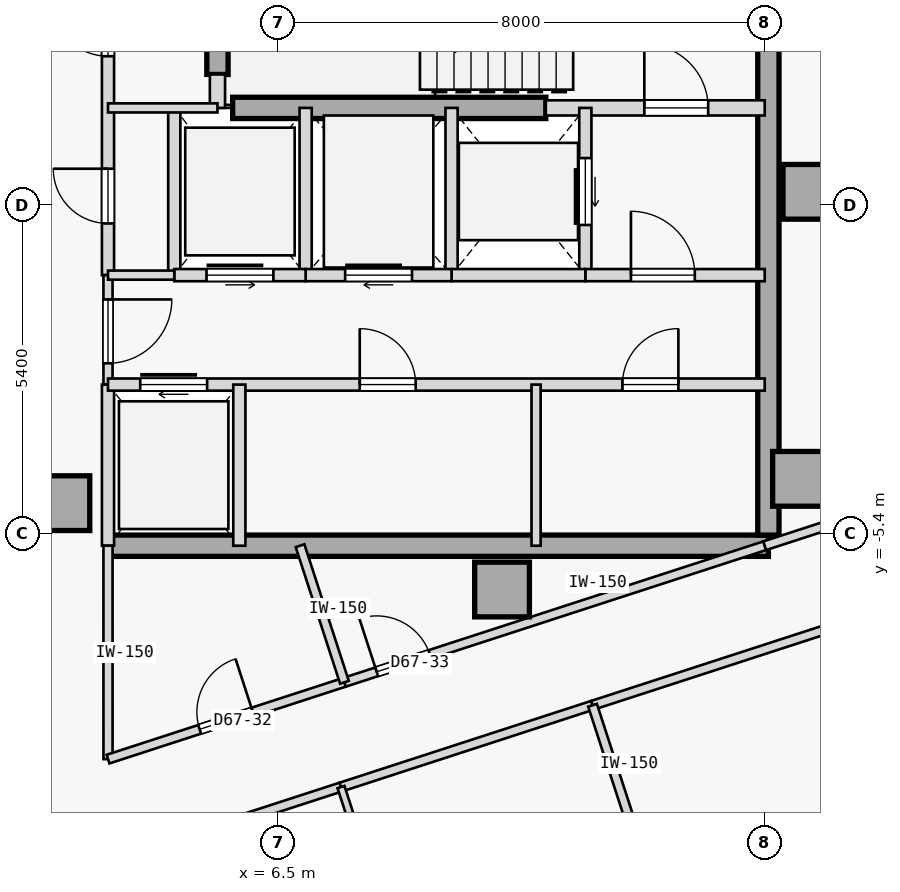
"""IFC4 building model, lengths in metres.
Left out: names, types, materials, properties, quantities, classifications, styles, units other than length and angle.
Written with IfcOpenShell. Run it as: python <this file> out.ifc"""

import sys

from ifc_helpers import new_model, si_unit, direction, frame, frame_2d, origin, origin_2d, place, context, subcontext, project, spatial, rectangle, extrude, element, fill, save


model = new_model("IFC4")
c1 = context("Model", 3, precision=1e-05, world=origin(), true_north=direction((0.0, 1.0)))
c2 = subcontext(c1, "Body", "Model", "MODEL_VIEW")
j1 = project(units=[si_unit("LENGTHUNIT", "METRE"), si_unit("PLANEANGLEUNIT", "RADIAN")], contexts=[c1])
p1 = place(None, origin())
s1 = spatial("IfcSite", under=j1, at=p1, CompositionType="ELEMENT")
p2 = place(p1, origin())
s2 = spatial("IfcBuilding", under=s1, at=p2, CompositionType="ELEMENT")
p3 = place(p2, frame((0.0, 0.0, 251.1)))
s3 = spatial("IfcBuildingStorey", under=s2, at=p3, CompositionType="ELEMENT", Elevation=251.1)
for number, where, z_axis, x_axis in (
    (1, (15.25, 0.22, 0.0), (0.0, 0.0, 1.0), (1.0, 0.0, 0.0)),
    (2, (15.08, -4.5, 0.0), (0.0, 0.0, 1.0), (1.0, 0.0, 0.0)),
    (3, (10.18, -6.32, 0.0), (0.0, 0.0, 1.0), (1.0, 0.0, 0.0)),
    (4, (2.95, -4.9, 0.0), (0.0, 0.0, 1.0), (1.0, 0.0, 0.0)),
):
    element("IfcColumn", number, at=place(p3, frame(where, z_axis=z_axis, x_axis=x_axis)), inside=s3, PredefinedType="COLUMN", context=c2, shape_type="SweptSolid", body=[
        extrude(rectangle(XDim=0.9, YDim=0.9, at=origin_2d()), origin(), (0.0, 0.0, 1.0), 3.35),
    ])
p4 = place(p3, frame((3.7, -5.6, 0.0), z_axis=(0.0, 0.0, 1.0), x_axis=(1.0, 0.0, 0.0)))
e5 = element("IfcWall", 5, at=p4, inside=s3, PredefinedType="SHEAR", context=c2, shape_type="SweptSolid", body=[
    extrude(rectangle(XDim=10.86, YDim=0.35, at=frame_2d((5.43, 0.0))), origin(), (0.0, 0.0, 1.0), 2.95),
])
p5 = place(p3, frame((14.56, -5.425, 0.0), z_axis=(0.0, 0.0, 1.0), x_axis=(0.0, 1.0, 0.0)))
e6 = element("IfcWall", 6, at=p5, inside=s3, PredefinedType="SHEAR", context=c2, shape_type="SweptSolid", body=[
    extrude(rectangle(XDim=10.85, YDim=0.35, at=frame_2d((5.425, 0.0))), origin(), (0.0, 0.0, 1.0), 2.95),
])
p6 = place(p3, frame((5.5, 2.15, 0.0), z_axis=(0.0, 0.0, 1.0), x_axis=(0.0, 1.0, 0.0)))
e7 = element("IfcWall", 7, at=p6, inside=s3, PredefinedType="SHEAR", context=c2, shape_type="SweptSolid", body=[
    extrude(rectangle(XDim=3.275, YDim=0.35, at=frame_2d((1.638, 0.0))), origin(), (0.0, 0.0, 1.0), 2.95),
])
p7 = place(p3, frame((5.75, 1.6, 0.0), z_axis=(0.0, 0.0, 1.0), x_axis=(1.0, 0.0, 0.0)))
e8 = element("IfcWall", 8, at=p7, inside=s3, PredefinedType="SHEAR", context=c2, shape_type="SweptSolid", body=[
    extrude(rectangle(XDim=5.15, YDim=0.35, at=frame_2d((2.575, 0.0))), origin(), (0.0, 0.0, 1.0), 2.95),
])
p8 = place(p3, frame((10.9, 1.6, 0.0), z_axis=(0.0, 0.0, 1.0), x_axis=(1.0, 0.0, 0.0)))
e9 = element("IfcWall", 9, at=p8, inside=s3, PredefinedType="STANDARD", context=c2, shape_type="SweptSolid", body=[
    extrude(rectangle(XDim=3.6, YDim=0.25, at=frame_2d((1.8, 0.0))), origin(), (0.0, 0.0, 1.0), 2.95),
])
p9 = place(p8, frame((1.62, 0.0, 0.0)))
e10 = element("IfcOpeningElement", 10, at=p9, cuts=e9, PredefinedType="OPENING", context=c2, shape_type="SweptSolid", body=[
    extrude(rectangle(XDim=1.05, YDim=2.15, at=frame_2d((0.525, 1.075))), frame((0.0, 0.135, 0.0), z_axis=(0.0, -1.0, 0.0), x_axis=(1.0, 0.0, 0.0)), (0.0, 0.0, 1.0), 0.27),
])
p10 = place(p3, frame((5.5, 1.6, 0.0), z_axis=(0.0, 0.0, 1.0), x_axis=(0.0, 1.0, 0.0)))
e11 = element("IfcWall", 11, at=p10, inside=s3, PredefinedType="STANDARD", context=c2, shape_type="SweptSolid", body=[
    extrude(rectangle(XDim=0.55, YDim=0.25, at=frame_2d((0.275, 0.0))), origin(), (0.0, 0.0, 1.0), 2.95),
])
p11 = place(p3, frame((3.7, -1.15, 0.0), z_axis=(0.0, 0.0, 1.0), x_axis=(0.0, 1.0, 0.0)))
e12 = element("IfcWall", 12, at=p11, inside=s3, PredefinedType="STANDARD", context=c2, shape_type="SweptSolid", body=[
    extrude(rectangle(XDim=6.75, YDim=0.2, at=frame_2d((3.375, 0.0))), origin(), (0.0, 0.0, 1.0), 2.95),
])
p12 = place(p11, frame((3.6, 0.0, 0.0)))
e13 = element("IfcOpeningElement", 13, at=p12, cuts=e12, PredefinedType="OPENING", context=c2, shape_type="SweptSolid", body=[
    extrude(rectangle(XDim=0.92, YDim=2.15, at=frame_2d((0.46, 1.075))), frame((0.0, 0.11, 0.0), z_axis=(0.0, -1.0, 0.0), x_axis=(1.0, 0.0, 0.0)), (0.0, 0.0, 1.0), 0.22),
])
p13 = place(p11, frame((0.85, 0.0, 0.0)))
e14 = element("IfcOpeningElement", 14, at=p13, cuts=e12, PredefinedType="OPENING", context=c2, shape_type="SweptSolid", body=[
    extrude(rectangle(XDim=0.9, YDim=2.15, at=frame_2d((0.45, 1.075))), frame((0.0, 0.11, 0.0), z_axis=(0.0, -1.0, 0.0), x_axis=(1.0, 0.0, 0.0)), (0.0, 0.0, 1.0), 0.22),
])
p14 = place(p3, frame((3.7, -2.95, 0.0), z_axis=(0.0, 0.0, 1.0), x_axis=(0.0, 1.0, 0.0)))
e15 = element("IfcWall", 15, at=p14, inside=s3, PredefinedType="PARTITIONING", context=c2, shape_type="SweptSolid", body=[
    extrude(rectangle(XDim=1.8, YDim=0.15, at=frame_2d((0.9, 0.0))), origin(), (0.0, 0.0, 1.0), 2.95),
])
p15 = place(p14, frame((0.35, 0.0, 0.0)))
e16 = element("IfcOpeningElement", 16, at=p15, cuts=e15, PredefinedType="OPENING", context=c2, shape_type="SweptSolid", body=[
    extrude(rectangle(XDim=1.05, YDim=2.18, at=frame_2d((0.525, 1.09))), frame((0.0, 0.085, 0.0), z_axis=(0.0, -1.0, 0.0), x_axis=(1.0, 0.0, 0.0)), (0.0, 0.0, 1.0), 0.17),
])
p16 = place(p3, frame((3.7, -5.6, 0.0), z_axis=(0.0, 0.0, 1.0), x_axis=(0.0, 1.0, 0.0)))
e17 = element("IfcWall", 17, at=p16, inside=s3, PredefinedType="STANDARD", context=c2, shape_type="SweptSolid", body=[
    extrude(rectangle(XDim=2.65, YDim=0.2, at=frame_2d((1.325, 0.0))), origin(), (0.0, 0.0, 1.0), 2.95),
])
p17 = place(p3, frame((11.55, -1.15, 0.0), z_axis=(0.0, 0.0, 1.0), x_axis=(0.0, 1.0, 0.0)))
e18 = element("IfcWall", 18, at=p17, inside=s3, PredefinedType="STANDARD", context=c2, shape_type="SweptSolid", body=[
    extrude(rectangle(XDim=2.75, YDim=0.2, at=frame_2d((1.375, 0.0))), origin(), (0.0, 0.0, 1.0), 2.95),
])
p18 = place(p17, frame((0.825, 0.0, 0.0)))
e19 = element("IfcOpeningElement", 19, at=p18, cuts=e18, PredefinedType="OPENING", context=c2, shape_type="SweptSolid", body=[
    extrude(rectangle(XDim=1.1, YDim=2.15, at=frame_2d((0.55, 1.075))), frame((0.0, 0.11, 0.0), z_axis=(0.0, -1.0, 0.0), x_axis=(1.0, 0.0, 0.0)), (0.0, 0.0, 1.0), 0.22),
])
p19 = place(p3, frame((9.35, -1.15, 0.0), z_axis=(0.0, 0.0, 1.0), x_axis=(0.0, 1.0, 0.0)))
e20 = element("IfcWall", 20, at=p19, inside=s3, PredefinedType="STANDARD", context=c2, shape_type="SweptSolid", body=[
    extrude(rectangle(XDim=2.75, YDim=0.2, at=frame_2d((1.375, 0.0))), origin(), (0.0, 0.0, 1.0), 2.95),
])
p20 = place(p3, frame((11.55, -1.15, 0.0), z_axis=(0.0, 0.0, 1.0), x_axis=(1.0, 0.0, 0.0)))
e21 = element("IfcWall", 21, at=p20, inside=s3, PredefinedType="STANDARD", context=c2, shape_type="SweptSolid", body=[
    extrude(rectangle(XDim=2.95, YDim=0.2, at=frame_2d((1.475, 0.0))), origin(), (0.0, 0.0, 1.0), 2.95),
])
p21 = place(p20, frame((0.75, 0.0, 0.0)))
e22 = element("IfcOpeningElement", 22, at=p21, cuts=e21, PredefinedType="OPENING", context=c2, shape_type="SweptSolid", body=[
    extrude(rectangle(XDim=1.05, YDim=2.18, at=frame_2d((0.525, 1.09))), frame((0.0, 0.11, 0.0), z_axis=(0.0, -1.0, 0.0), x_axis=(1.0, 0.0, 0.0)), (0.0, 0.0, 1.0), 0.22),
])
p22 = place(p3, frame((9.35, -1.15, 0.0), z_axis=(0.0, 0.0, 1.0), x_axis=(1.0, 0.0, 0.0)))
e23 = element("IfcWall", 23, at=p22, inside=s3, PredefinedType="STANDARD", context=c2, shape_type="SweptSolid", body=[
    extrude(rectangle(XDim=2.2, YDim=0.2, at=frame_2d((1.1, 0.0))), origin(), (0.0, 0.0, 1.0), 2.95),
])
p23 = place(p3, frame((6.95, -1.15, 0.0), z_axis=(0.0, 0.0, 1.0), x_axis=(0.0, 1.0, 0.0)))
e24 = element("IfcWall", 24, at=p23, inside=s3, PredefinedType="STANDARD", context=c2, shape_type="SweptSolid", body=[
    extrude(rectangle(XDim=2.75, YDim=0.2, at=frame_2d((1.375, 0.0))), origin(), (0.0, 0.0, 1.0), 2.95),
])
p24 = place(p3, frame((6.95, -1.15, 0.0), z_axis=(0.0, 0.0, 1.0), x_axis=(1.0, 0.0, 0.0)))
e25 = element("IfcWall", 25, at=p24, inside=s3, PredefinedType="STANDARD", context=c2, shape_type="SweptSolid", body=[
    extrude(rectangle(XDim=2.4, YDim=0.2, at=frame_2d((1.2, 0.0))), origin(), (0.0, 0.0, 1.0), 2.95),
])
p25 = place(p24, frame((0.65, 0.0, 0.0)))
e26 = element("IfcOpeningElement", 26, at=p25, cuts=e25, PredefinedType="OPENING", context=c2, shape_type="SweptSolid", body=[
    extrude(rectangle(XDim=1.1, YDim=2.15, at=frame_2d((0.55, 1.075))), frame((0.0, 0.11, 0.0), z_axis=(0.0, -1.0, 0.0), x_axis=(1.0, 0.0, 0.0)), (0.0, 0.0, 1.0), 0.22),
])
p26 = place(p3, frame((4.79, -1.15, 0.0), z_axis=(0.0, 0.0, 1.0), x_axis=(0.0, 1.0, 0.0)))
e27 = element("IfcWall", 27, at=p26, inside=s3, PredefinedType="STANDARD", context=c2, shape_type="SweptSolid", body=[
    extrude(rectangle(XDim=2.75, YDim=0.2, at=frame_2d((1.375, 0.0))), origin(), (0.0, 0.0, 1.0), 2.95),
])
p27 = place(p3, frame((4.79, -1.15, 0.0), z_axis=(0.0, 0.0, 1.0), x_axis=(1.0, 0.0, 0.0)))
e28 = element("IfcWall", 28, at=p27, inside=s3, PredefinedType="STANDARD", context=c2, shape_type="SweptSolid", body=[
    extrude(rectangle(XDim=2.16, YDim=0.2, at=frame_2d((1.08, 0.0))), origin(), (0.0, 0.0, 1.0), 2.95),
])
p28 = place(p27, frame((0.53, 0.0, 0.0)))
e29 = element("IfcOpeningElement", 29, at=p28, cuts=e28, PredefinedType="OPENING", context=c2, shape_type="SweptSolid", body=[
    extrude(rectangle(XDim=1.1, YDim=2.15, at=frame_2d((0.55, 1.075))), frame((0.0, 0.11, 0.0), z_axis=(0.0, -1.0, 0.0), x_axis=(1.0, 0.0, 0.0)), (0.0, 0.0, 1.0), 0.22),
])
p29 = place(p3, frame((3.7, -1.15, 0.0), z_axis=(0.0, 0.0, 1.0), x_axis=(1.0, 0.0, 0.0)))
e30 = element("IfcWall", 30, at=p29, inside=s3, PredefinedType="PARTITIONING", context=c2, shape_type="SweptSolid", body=[
    extrude(rectangle(XDim=1.09, YDim=0.15, at=frame_2d((0.545, 0.0))), origin(), (0.0, 0.0, 1.0), 2.95),
])
p30 = place(p3, frame((3.7, -2.95, 0.0), z_axis=(0.0, 0.0, 1.0), x_axis=(1.0, 0.0, 0.0)))
e31 = element("IfcWall", 31, at=p30, inside=s3, PredefinedType="STANDARD", context=c2, shape_type="SweptSolid", body=[
    extrude(rectangle(XDim=10.8, YDim=0.2, at=frame_2d((5.4, 0.0))), origin(), (0.0, 0.0, 1.0), 2.95),
])
p31 = place(p30, frame((0.53, 0.0, 0.0)))
e32 = element("IfcOpeningElement", 32, at=p31, cuts=e31, PredefinedType="OPENING", context=c2, shape_type="SweptSolid", body=[
    extrude(rectangle(XDim=1.1, YDim=2.15, at=frame_2d((0.55, 1.075))), frame((0.0, 0.11, 0.0), z_axis=(0.0, -1.0, 0.0), x_axis=(1.0, 0.0, 0.0)), (0.0, 0.0, 1.0), 0.22),
])
p32 = place(p30, frame((4.14, 0.0, 0.0)))
e33 = element("IfcOpeningElement", 33, at=p32, cuts=e31, PredefinedType="OPENING", context=c2, shape_type="SweptSolid", body=[
    extrude(rectangle(XDim=0.92, YDim=2.15, at=frame_2d((0.46, 1.075))), frame((0.0, 0.11, 0.0), z_axis=(0.0, -1.0, 0.0), x_axis=(1.0, 0.0, 0.0)), (0.0, 0.0, 1.0), 0.22),
])
p33 = place(p30, frame((8.46, 0.0, 0.0)))
e34 = element("IfcOpeningElement", 34, at=p33, cuts=e31, PredefinedType="OPENING", context=c2, shape_type="SweptSolid", body=[
    extrude(rectangle(XDim=0.92, YDim=2.15, at=frame_2d((0.46, 1.075))), frame((0.0, 0.11, 0.0), z_axis=(0.0, -1.0, 0.0), x_axis=(1.0, 0.0, 0.0)), (0.0, 0.0, 1.0), 0.22),
])
p34 = place(p3, frame((5.86, -5.6, 0.0), z_axis=(0.0, 0.0, 1.0), x_axis=(0.0, 1.0, 0.0)))
e35 = element("IfcWall", 35, at=p34, inside=s3, PredefinedType="STANDARD", context=c2, shape_type="SweptSolid", body=[
    extrude(rectangle(XDim=2.65, YDim=0.2, at=frame_2d((1.325, 0.0))), origin(), (0.0, 0.0, 1.0), 2.95),
])
p35 = place(p3, frame((10.74, -5.6, 0.0), z_axis=(0.0, 0.0, 1.0), x_axis=(0.0, 1.0, 0.0)))
e36 = element("IfcWall", 36, at=p35, inside=s3, PredefinedType="PARTITIONING", context=c2, shape_type="SweptSolid", body=[
    extrude(rectangle(XDim=2.65, YDim=0.15, at=frame_2d((1.325, 0.0))), origin(), (0.0, 0.0, 1.0), 2.95),
])
p36 = place(p3, frame((3.7, 1.6, 0.0), z_axis=(0.0, 0.0, 1.0), x_axis=(1.0, 0.0, 0.0)))
e37 = element("IfcWall", 37, at=p36, inside=s3, PredefinedType="PARTITIONING", context=c2, shape_type="SweptSolid", body=[
    extrude(rectangle(XDim=1.8, YDim=0.15, at=frame_2d((0.9, 0.0))), origin(), (0.0, 0.0, 1.0), 2.95),
])
p37 = place(p3, frame((11.669, -8.223, 0.0), z_axis=(0.0, 0.0, 1.0), x_axis=(0.951057967787, 0.309012527106, 0.0)))
e38 = element("IfcWall", 38, at=p37, inside=s3, PredefinedType="PARTITIONING", context=c2, shape_type="SweptSolid", body=[
    extrude(rectangle(XDim=19.291, YDim=0.15, at=frame_2d((9.646, 0.0))), origin(), (0.0, 0.0, 1.0), 2.95),
])
p38 = place(p37, frame((9.17, 0.0, 0.0)))
e39 = element("IfcOpeningElement", 39, at=p38, cuts=e38, PredefinedType="OPENING", context=c2, shape_type="SweptSolid", body=[
    extrude(rectangle(XDim=0.95, YDim=2.15, at=frame_2d((0.475, 1.075))), frame((0.0, 0.085, 0.0), z_axis=(0.0, -1.0, 0.0), x_axis=(1.0, 0.0, 0.0)), (0.0, 0.0, 1.0), 0.17),
])
p39 = place(p3, frame((5.297, -10.294, 0.0), z_axis=(0.0, 0.0, 1.0), x_axis=(0.951066131077, 0.308987401554, 0.0)))
e40 = element("IfcWall", 40, at=p39, inside=s3, PredefinedType="PARTITIONING", context=c2, shape_type="SweptSolid", body=[
    extrude(rectangle(XDim=2.35, YDim=0.15, at=frame_2d((1.175, 0.0))), origin(), (0.0, 0.0, 1.0), 2.95),
])
p40 = place(p3, frame((7.531, -9.568, 0.0), z_axis=(0.0, 0.0, 1.0), x_axis=(0.951041492154, 0.309063230101, 0.0)))
e41 = element("IfcWall", 41, at=p40, inside=s3, PredefinedType="PARTITIONING", context=c2, shape_type="SweptSolid", body=[
    extrude(rectangle(XDim=4.35, YDim=0.15, at=frame_2d((2.175, 0.0))), origin(), (0.0, 0.0, 1.0), 2.95),
])
p41 = place(p3, frame((3.7, -9.109, 0.0), z_axis=(0.0, 0.0, 1.0), x_axis=(-0.000139130433, 0.999999990321, 0.0)))
e42 = element("IfcWall", 42, at=p41, inside=s3, PredefinedType="PARTITIONING", context=c2, shape_type="SweptSolid", body=[
    extrude(rectangle(XDim=3.51, YDim=0.15, at=frame_2d((1.755, 0.0))), origin(), (0.0, 0.0, 1.0), 2.95),
])
p42 = place(p3, frame((3.7, -9.109, 0.0), z_axis=(0.0, 0.0, 1.0), x_axis=(0.95106259184, 0.308998295145, 0.0)))
e43 = element("IfcWall", 43, at=p42, inside=s3, PredefinedType="PARTITIONING", context=c2, shape_type="SweptSolid", body=[
    extrude(rectangle(XDim=4.088, YDim=0.15, at=frame_2d((2.044, 0.0))), origin(), (0.0, 0.0, 1.0), 2.95),
])
p43 = place(p42, frame((1.584, 0.0, 0.0)))
e44 = element("IfcOpeningElement", 44, at=p43, cuts=e43, PredefinedType="OPENING", context=c2, shape_type="SweptSolid", body=[
    extrude(rectangle(XDim=0.92, YDim=2.15, at=frame_2d((0.46, 1.075))), frame((0.0, 0.085, 0.0), z_axis=(0.0, -1.0, 0.0), x_axis=(1.0, 0.0, 0.0)), (0.0, 0.0, 1.0), 0.17),
])
p44 = place(p3, frame((7.588, -7.846, 0.0), z_axis=(0.0, 0.0, 1.0), x_axis=(0.951058013903, 0.309012385174, 0.0)))
e45 = element("IfcWall", 45, at=p44, inside=s3, PredefinedType="PARTITIONING", context=c2, shape_type="SweptSolid", body=[
    extrude(rectangle(XDim=7.267, YDim=0.15, at=frame_2d((3.634, 0.0))), origin(), (0.0, 0.0, 1.0), 2.95),
])
p45 = place(p44, frame((0.557, 0.0, 0.0)))
e46 = element("IfcOpeningElement", 46, at=p45, cuts=e45, PredefinedType="OPENING", context=c2, shape_type="SweptSolid", body=[
    extrude(rectangle(XDim=0.92, YDim=2.15, at=frame_2d((0.46, 1.075))), frame((0.0, 0.085, 0.0), z_axis=(0.0, -1.0, 0.0), x_axis=(1.0, 0.0, 0.0)), (0.0, 0.0, 1.0), 0.17),
])
p46 = place(p3, frame((14.5, -5.6, 0.0), z_axis=(0.0, 0.0, 1.0), x_axis=(0.951047546178, 0.309044600193, 0.0)))
e47 = element("IfcWall", 47, at=p46, inside=s3, PredefinedType="PARTITIONING", context=c2, shape_type="SweptSolid", body=[
    extrude(rectangle(XDim=3.461, YDim=0.15, at=frame_2d((1.73, 0.0))), origin(), (0.0, 0.0, 1.0), 2.95),
])
p47 = place(p46, frame((1.79, 0.0, 0.0)))
e48 = element("IfcOpeningElement", 48, at=p47, cuts=e47, PredefinedType="OPENING", context=c2, shape_type="SweptSolid", body=[
    extrude(rectangle(XDim=0.92, YDim=2.15, at=frame_2d((0.46, 1.075))), frame((0.0, 0.085, 0.0), z_axis=(0.0, -1.0, 0.0), x_axis=(1.0, 0.0, 0.0)), (0.0, 0.0, 1.0), 0.17),
])
p48 = place(p3, frame((12.349, -10.316, 0.0), z_axis=(0.0, 0.0, 1.0), x_axis=(-0.309028364152, 0.951052821956, 0.0)))
e49 = element("IfcWall", 49, at=p48, inside=s3, PredefinedType="PARTITIONING", context=c2, shape_type="SweptSolid", body=[
    extrude(rectangle(XDim=2.2, YDim=0.15, at=frame_2d((1.1, 0.0))), origin(), (0.0, 0.0, 1.0), 2.95),
])
p49 = place(p3, frame((8.211, -11.66, 0.0), z_axis=(0.0, 0.0, 1.0), x_axis=(-0.309060979314, 0.951042223598, 0.0)))
e50 = element("IfcWall", 50, at=p49, inside=s3, PredefinedType="PARTITIONING", context=c2, shape_type="SweptSolid", body=[
    extrude(rectangle(XDim=2.2, YDim=0.12, at=frame_2d((1.1, 0.0))), origin(), (0.0, 0.0, 1.0), 2.95),
])
p50 = place(p3, frame((7.588, -7.846, 0.0), z_axis=(0.0, 0.0, 1.0), x_axis=(-0.309055688452, 0.951043942957, 0.0)))
e51 = element("IfcWall", 51, at=p50, inside=s3, PredefinedType="PARTITIONING", context=c2, shape_type="SweptSolid", body=[
    extrude(rectangle(XDim=2.362, YDim=0.15, at=frame_2d((1.181, 0.0))), origin(), (0.0, 0.0, 1.0), 2.95),
])
p51 = place(p9, origin())
e52 = element("IfcDoor", 52, at=p51, inside=s3, OperationType="SINGLE_SWING_LEFT", PredefinedType="DOOR", context=c2, shape_type="SweptSolid", body=[
    extrude(rectangle(XDim=1.05, YDim=2.15, at=frame_2d((0.525, 1.075))), frame((0.0, 0.025, 0.0), z_axis=(0.0, -1.0, 0.0), x_axis=(1.0, 0.0, 0.0)), (0.0, 0.0, 1.0), 0.05),
])
fill(e10, e52)
p52 = place(p21, origin())
e53 = element("IfcDoor", 53, at=p52, inside=s3, OperationType="SINGLE_SWING_LEFT", PredefinedType="DOOR", context=c2, shape_type="SweptSolid", body=[
    extrude(rectangle(XDim=1.05, YDim=2.18, at=frame_2d((0.525, 1.09))), frame((0.0, 0.025, 0.0), z_axis=(0.0, -1.0, 0.0), x_axis=(1.0, 0.0, 0.0)), (0.0, 0.0, 1.0), 0.05),
])
fill(e22, e53)
p53 = place(p15, frame((1.05, 0.0, 0.0), z_axis=(0.0, 0.0, 1.0), x_axis=(-1.0, 0.0, 0.0)))
e54 = element("IfcDoor", 54, at=p53, inside=s3, OperationType="SINGLE_SWING_RIGHT", PredefinedType="DOOR", context=c2, shape_type="SweptSolid", body=[
    extrude(rectangle(XDim=1.05, YDim=2.18, at=frame_2d((0.525, 1.09))), frame((0.0, 0.025, 0.0), z_axis=(0.0, -1.0, 0.0), x_axis=(1.0, 0.0, 0.0)), (0.0, 0.0, 1.0), 0.05),
])
fill(e16, e54)
p54 = place(p18, origin())
e55 = element("IfcDoor", 55, at=p54, inside=s3, OperationType="SLIDING_TO_RIGHT", PredefinedType="DOOR", context=c2, shape_type="SweptSolid", body=[
    extrude(rectangle(XDim=1.1, YDim=2.15, at=frame_2d((0.55, 1.075))), frame((0.0, 0.025, 0.0), z_axis=(0.0, -1.0, 0.0), x_axis=(1.0, 0.0, 0.0)), (0.0, 0.0, 1.0), 0.05),
])
fill(e19, e55)
p55 = place(p25, origin())
e56 = element("IfcDoor", 56, at=p55, inside=s3, OperationType="SLIDING_TO_RIGHT", PredefinedType="DOOR", context=c2, shape_type="SweptSolid", body=[
    extrude(rectangle(XDim=1.1, YDim=2.15, at=frame_2d((0.55, 1.075))), frame((0.0, 0.025, 0.0), z_axis=(0.0, -1.0, 0.0), x_axis=(1.0, 0.0, 0.0)), (0.0, 0.0, 1.0), 0.05),
])
fill(e26, e56)
p56 = place(p28, origin())
e57 = element("IfcDoor", 57, at=p56, inside=s3, OperationType="SLIDING_TO_LEFT", PredefinedType="DOOR", context=c2, shape_type="SweptSolid", body=[
    extrude(rectangle(XDim=1.1, YDim=2.15, at=frame_2d((0.55, 1.075))), frame((0.0, 0.025, 0.0), z_axis=(0.0, -1.0, 0.0), x_axis=(1.0, 0.0, 0.0)), (0.0, 0.0, 1.0), 0.05),
])
fill(e29, e57)
p57 = place(p31, origin())
e58 = element("IfcDoor", 58, at=p57, inside=s3, OperationType="SLIDING_TO_RIGHT", PredefinedType="DOOR", context=c2, shape_type="SweptSolid", body=[
    extrude(rectangle(XDim=1.1, YDim=2.15, at=frame_2d((0.55, 1.075))), frame((0.0, 0.025, 0.0), z_axis=(0.0, -1.0, 0.0), x_axis=(1.0, 0.0, 0.0)), (0.0, 0.0, 1.0), 0.05),
])
fill(e32, e58)
p58 = place(p32, origin())
e59 = element("IfcDoor", 59, at=p58, inside=s3, OperationType="SINGLE_SWING_LEFT", PredefinedType="DOOR", context=c2, shape_type="SweptSolid", body=[
    extrude(rectangle(XDim=0.92, YDim=2.15, at=frame_2d((0.46, 1.075))), frame((0.0, 0.025, 0.0), z_axis=(0.0, -1.0, 0.0), x_axis=(1.0, 0.0, 0.0)), (0.0, 0.0, 1.0), 0.05),
])
fill(e33, e59)
p59 = place(p33, origin())
e60 = element("IfcDoor", 60, at=p59, inside=s3, OperationType="SINGLE_SWING_RIGHT", PredefinedType="DOOR", context=c2, shape_type="SweptSolid", body=[
    extrude(rectangle(XDim=0.92, YDim=2.15, at=frame_2d((0.46, 1.075))), frame((0.0, 0.025, 0.0), z_axis=(0.0, -1.0, 0.0), x_axis=(1.0, 0.0, 0.0)), (0.0, 0.0, 1.0), 0.05),
])
fill(e34, e60)
p60 = place(p12, origin())
e61 = element("IfcDoor", 61, at=p60, inside=s3, OperationType="SINGLE_SWING_RIGHT", PredefinedType="DOOR", context=c2, shape_type="SweptSolid", body=[
    extrude(rectangle(XDim=0.92, YDim=2.15, at=frame_2d((0.46, 1.075))), frame((0.0, 0.025, 0.0), z_axis=(0.0, -1.0, 0.0), x_axis=(1.0, 0.0, 0.0)), (0.0, 0.0, 1.0), 0.05),
])
fill(e13, e61)
p61 = place(p13, origin())
e62 = element("IfcDoor", 62, at=p61, inside=s3, OperationType="SINGLE_SWING_RIGHT", PredefinedType="DOOR", context=c2, shape_type="SweptSolid", body=[
    extrude(rectangle(XDim=0.9, YDim=2.15, at=frame_2d((0.45, 1.075))), frame((0.0, 0.025, 0.0), z_axis=(0.0, -1.0, 0.0), x_axis=(1.0, 0.0, 0.0)), (0.0, 0.0, 1.0), 0.05),
])
fill(e14, e62)
p62 = place(p43, origin())
e63 = element("IfcDoor", 63, at=p62, inside=s3, OperationType="SINGLE_SWING_RIGHT", PredefinedType="DOOR", context=c2, shape_type="SweptSolid", body=[
    extrude(rectangle(XDim=0.92, YDim=2.15, at=frame_2d((0.46, 1.075))), frame((0.0, 0.025, 0.0), z_axis=(0.0, -1.0, 0.0), x_axis=(1.0, 0.0, 0.0)), (0.0, 0.0, 1.0), 0.05),
])
fill(e44, e63)
p63 = place(p45, origin())
e64 = element("IfcDoor", 64, at=p63, inside=s3, OperationType="SINGLE_SWING_LEFT", PredefinedType="DOOR", context=c2, shape_type="SweptSolid", body=[
    extrude(rectangle(XDim=0.92, YDim=2.15, at=frame_2d((0.46, 1.075))), frame((0.0, 0.025, 0.0), z_axis=(0.0, -1.0, 0.0), x_axis=(1.0, 0.0, 0.0)), (0.0, 0.0, 1.0), 0.05),
])
fill(e46, e64)
save(model, sys.argv[1])
